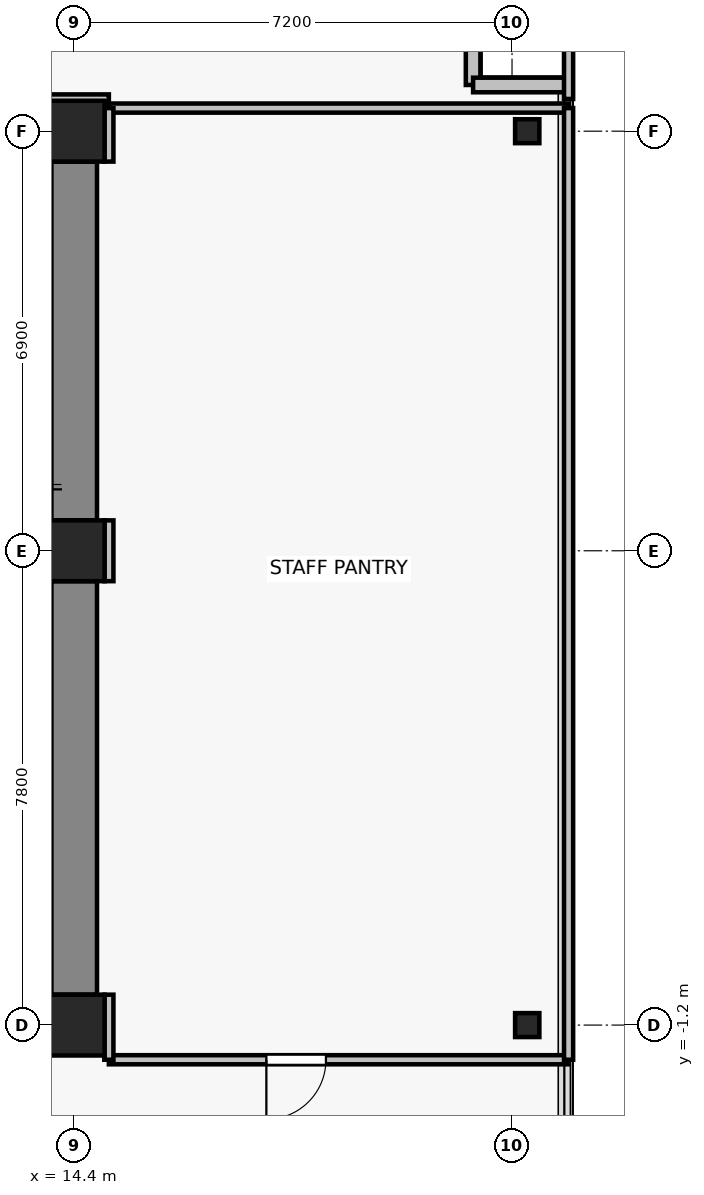
"""IFC4 building model, lengths in metres.
Left out: names, types, materials, properties, quantities, classifications, styles, units other than length and angle.
Written with IfcOpenShell. Run it as: python <this file> out.ifc"""

import sys

from ifc_helpers import new_model, si_unit, direction, frame, frame_2d, origin, origin_2d, place, context, subcontext, project, spatial, rectangle, i_section, extrude, source, transform, mapped, element, fill, save


model = new_model("IFC4")
c1 = context("Model", 3, precision=1e-05, world=origin(), true_north=direction((0.0, 1.0)))
c2 = subcontext(c1, "Body", "Model", "MODEL_VIEW")
j1 = project(units=[si_unit("LENGTHUNIT", "METRE"), si_unit("PLANEANGLEUNIT", "RADIAN")], contexts=[c1])
p1 = place(None, origin())
s1 = spatial("IfcSite", under=j1, at=p1, CompositionType="ELEMENT")
p2 = place(p1, origin())
s2 = spatial("IfcBuilding", under=s1, at=p2, CompositionType="ELEMENT")
p3 = place(p2, frame((0.0, 0.0, 166.0)))
s3 = spatial("IfcBuildingStorey", under=s2, at=p3, CompositionType="ELEMENT", Elevation=166.0)
for number, where, z_axis, x_axis in (
    (1, (14.4, -1.2, 0.0), (0.0, 0.0, 1.0), (1.0, 0.0, 0.0)),
    (2, (14.4, 6.6, 0.0), (0.0, 0.0, 1.0), (1.0, 0.0, 0.0)),
    (3, (14.4, 13.5, 0.0), (0.0, 0.0, 1.0), (1.0, 0.0, 0.0)),
):
    element("IfcColumn", number, at=place(p3, frame(where, z_axis=z_axis, x_axis=x_axis)), inside=s3, PredefinedType="COLUMN", context=c2, shape_type="SweptSolid", body=[
        extrude(rectangle(XDim=1.0, YDim=1.0, at=origin_2d()), origin(), (0.0, 0.0, 1.0), 3.3),
    ])
for number, where, z_axis, x_axis in (
    (4, (21.85, -1.2, 0.0), (0.0, 0.0, 1.0), (1.0, 0.0, 0.0)),
    (5, (21.85, 13.5, 0.0), (0.0, 0.0, 1.0), (1.0, 0.0, 0.0)),
):
    element("IfcColumn", number, at=place(p3, frame(where, z_axis=z_axis, x_axis=x_axis)), inside=s3, PredefinedType="COLUMN", context=c2, shape_type="SweptSolid", body=[
        extrude(i_section(OverallWidth=0.399, OverallDepth=0.394, WebThickness=0.023, FlangeThickness=0.037, FilletRadius=0.015, at=origin_2d()), origin(), (0.0, 0.0, 1.0), 3.3),
    ])
p4 = place(p3, frame((14.4, -0.7, 0.0), z_axis=(0.0, 0.0, 1.0), x_axis=(0.0, 1.0, 0.0)))
e6 = element("IfcWall", 6, at=p4, inside=s3, PredefinedType="SHEAR", context=c2, shape_type="SweptSolid", body=[
    extrude(rectangle(XDim=6.8, YDim=0.75, at=frame_2d((3.4, 0.0))), origin(), (0.0, 0.0, 1.0), 3.075),
])
p5 = place(p3, frame((14.4, 7.1, 0.0), z_axis=(0.0, 0.0, 1.0), x_axis=(0.0, 1.0, 0.0)))
e7 = element("IfcWall", 7, at=p5, inside=s3, PredefinedType="SHEAR", context=c2, shape_type="SweptSolid", body=[
    extrude(rectangle(XDim=5.9, YDim=0.75, at=frame_2d((2.95, 0.0))), origin(), (0.0, 0.0, 1.0), 3.075),
])
for number, where, z_axis, x_axis in (
    (8, (20.96, 14.26, 0.0), (0.0, 0.0, 1.0), (0.0, 1.0, 0.0)),
    (9, (22.46, 14.26, 0.0), (0.0, 0.0, 1.0), (-1.0, 0.0, 0.0)),
):
    element("IfcWall", number, at=place(p3, frame(where, z_axis=z_axis, x_axis=x_axis)), inside=s3, PredefinedType="SOLIDWALL", context=c2, shape_type="SweptSolid", body=[
        extrude(rectangle(XDim=1.5, YDim=0.24, at=frame_2d((0.75, 0.0))), origin(), (0.0, 0.0, 1.0), 3.075),
    ])
p6 = place(p3, frame((22.53, -1.77, 0.0), z_axis=(0.0, 0.0, 1.0), x_axis=(-1.0, 0.0, 0.0)))
e10 = element("IfcWall", 10, at=p6, inside=s3, PredefinedType="PARTITIONING", context=c2, shape_type="SweptSolid", body=[
    extrude(rectangle(XDim=7.56, YDim=0.15, at=frame_2d((3.78, 0.0))), origin(), (0.0, 0.0, 1.0), 2.565),
])
p7 = place(p6, frame((3.99, 0.0, 0.0)))
e11 = element("IfcOpeningElement", 11, at=p7, cuts=e10, PredefinedType="OPENING", context=c2, shape_type="SweptSolid", body=[
    extrude(rectangle(XDim=0.98, YDim=2.15, at=frame_2d((0.49, 1.075))), frame((0.0, 0.085, 0.0), z_axis=(0.0, -1.0, 0.0), x_axis=(1.0, 0.0, 0.0)), (0.0, 0.0, 1.0), 0.17),
])
p8 = place(p3, frame((14.97, 13.88, 0.0), z_axis=(0.0, 0.0, 1.0), x_axis=(1.0, 0.0, 0.0)))
e12 = element("IfcWall", 12, at=p8, inside=s3, PredefinedType="PARTITIONING", context=c2, shape_type="SweptSolid", body=[
    extrude(rectangle(XDim=7.56, YDim=0.15, at=frame_2d((3.78, 0.0))), origin(), (0.0, 0.0, 1.0), 3.075),
])
p9 = place(p3, frame((14.97, -1.77, 0.0), z_axis=(0.0, 0.0, 1.0), x_axis=(0.0, 1.0, 0.0)))
e13 = element("IfcWall", 13, at=p9, inside=s3, PredefinedType="PARTITIONING", context=c2, shape_type="SweptSolid", body=[
    extrude(rectangle(XDim=1.07, YDim=0.15, at=frame_2d((0.535, 0.0))), origin(), (0.0, 0.0, 1.0), 2.565),
])
p10 = place(p3, frame((14.97, 6.1, 0.0), z_axis=(0.0, 0.0, 1.0), x_axis=(0.0, 1.0, 0.0)))
e14 = element("IfcWall", 14, at=p10, inside=s3, PredefinedType="PARTITIONING", context=c2, shape_type="SweptSolid", body=[
    extrude(rectangle(XDim=1.0, YDim=0.15, at=frame_2d((0.5, 0.0))), origin(), (0.0, 0.0, 1.0), 3.075),
])
p11 = place(p3, frame((14.97, 13.0, 0.0), z_axis=(0.0, 0.0, 1.0), x_axis=(0.0, 1.0, 0.0)))
e15 = element("IfcWall", 15, at=p11, inside=s3, PredefinedType="PARTITIONING", context=c2, shape_type="SweptSolid", body=[
    extrude(rectangle(XDim=0.88, YDim=0.15, at=frame_2d((0.44, 0.0))), origin(), (0.0, 0.0, 1.0), 2.565),
])
p12 = place(p3, frame((22.53, 13.88, 0.0), z_axis=(0.0, 0.0, 1.0), x_axis=(0.0, -1.0, 0.0)))
e16 = element("IfcWall", 16, at=p12, inside=s3, PredefinedType="PARTITIONING", context=c2, shape_type="SweptSolid", body=[
    extrude(rectangle(XDim=15.65, YDim=0.15, at=frame_2d((7.825, 0.0))), origin(), (0.0, 0.0, 1.0), 3.075),
])
p13 = place(p3, frame((14.97, 14.03, 0.0), z_axis=(0.0, 0.0, 1.0), x_axis=(-1.0, 0.0, 0.0)))
e17 = element("IfcWall", 17, at=p13, inside=s3, PredefinedType="PARTITIONING", context=c2, shape_type="SweptSolid", body=[
    extrude(rectangle(XDim=1.07, YDim=0.15, at=frame_2d((0.535, 0.0))), origin(), (0.0, 0.0, 1.0), 2.565),
])
p14 = place(p3, frame((22.53, 17.33, 0.0), z_axis=(0.0, 0.0, 1.0), x_axis=(0.0, -1.0, 0.0)))
e18 = element("IfcWall", 18, at=p14, inside=s3, PredefinedType="PARTITIONING", context=c2, shape_type="SweptSolid", body=[
    extrude(rectangle(XDim=3.3, YDim=0.15, at=frame_2d((1.65, 0.0))), origin(), (0.0, 0.0, 1.0), 3.075),
])
m1 = source(origin(), c2, "Body", "SweptSolid", [
    extrude(rectangle(XDim=0.98, YDim=2.15, at=frame_2d((0.49, 1.075))), frame((0.0, 0.025, 0.0), z_axis=(0.0, -1.0, 0.0), x_axis=(1.0, 0.0, 0.0)), (0.0, 0.0, 1.0), 0.05),
])
p15 = place(p7, origin())
e19 = element("IfcDoor", 19, at=p15, inside=s3, OperationType="SINGLE_SWING_RIGHT", PredefinedType="DOOR", context=c2, shape_type="MappedRepresentation", body=[
    mapped(m1, transform((0.0, 0.0, 0.0), x_axis=(1.0, 0.0, 0.0), y_axis=(0.0, 1.0, 0.0), z_axis=(0.0, 0.0, 1.0), scale=1.0)),
])
fill(e11, e19)
save(model, sys.argv[1])
